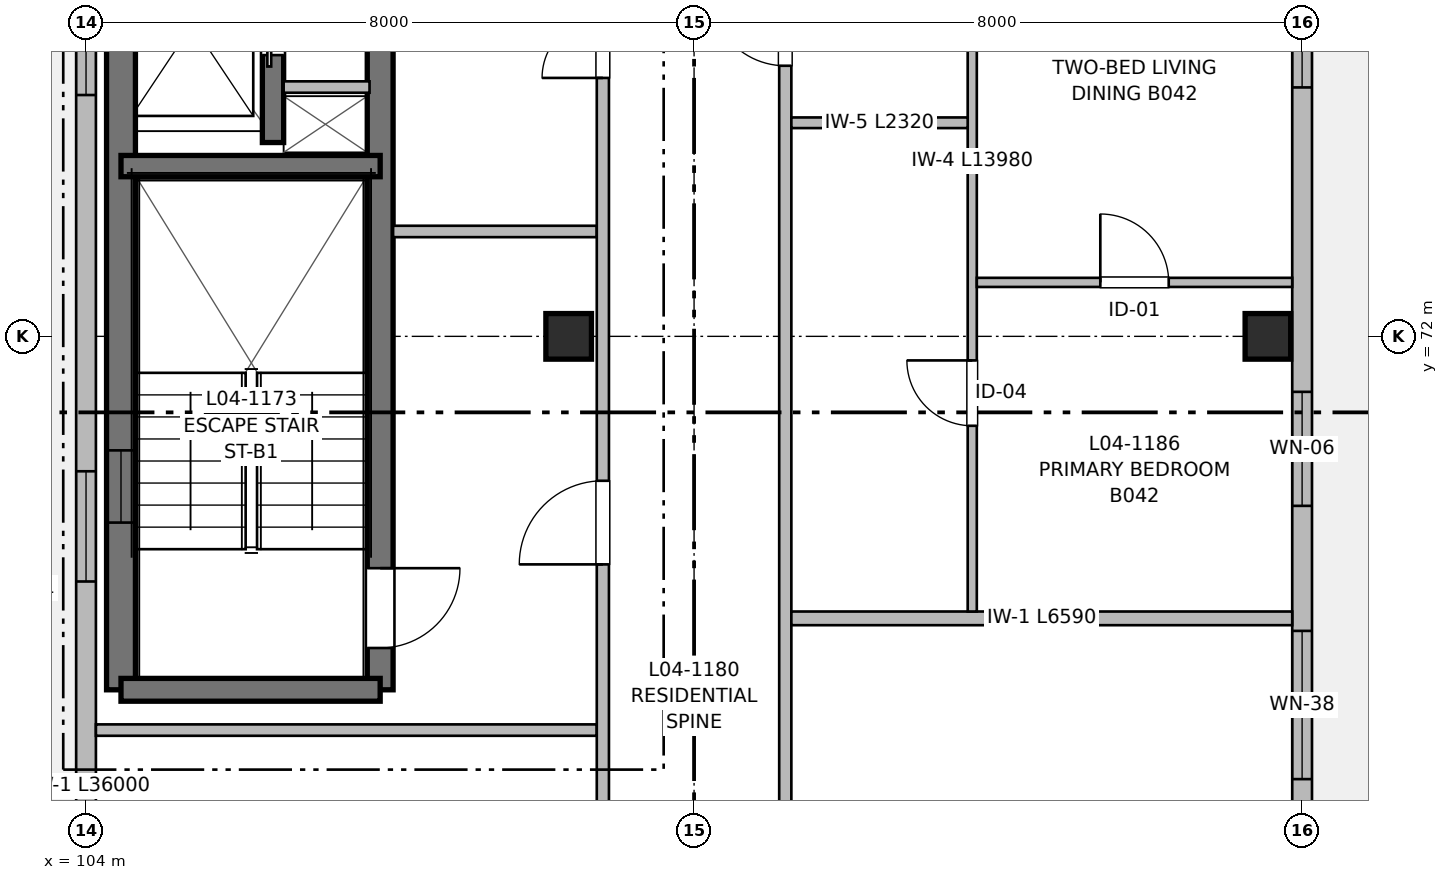
"""IFC4 building model, lengths in metres.
Left out: names, types, materials, properties, quantities, classifications, styles, units other than length and angle.
Written with IfcOpenShell. Run it as: python <this file> out.ifc"""

import sys

from ifc_helpers import new_model, si_unit, direction, frame, frame_2d, origin, origin_2d, place, context, subcontext, project, spatial, rectangle, extrude, element, fill, save


model = new_model("IFC4")
c1 = context("Model", 3, precision=1e-05, world=origin(), true_north=direction((0.0, 1.0)))
c2 = subcontext(c1, "Body", "Model", "MODEL_VIEW")
j1 = project(units=[si_unit("LENGTHUNIT", "METRE"), si_unit("PLANEANGLEUNIT", "RADIAN")], contexts=[c1])
p1 = place(None, origin())
s1 = spatial("IfcSite", under=j1, at=p1, CompositionType="ELEMENT")
p2 = place(p1, origin())
s2 = spatial("IfcBuilding", under=s1, at=p2, CompositionType="ELEMENT")
p3 = place(p2, frame((0.0, 0.0, 13.76)))
s3 = spatial("IfcBuildingStorey", under=s2, at=p3, CompositionType="ELEMENT", Elevation=13.76)
for number, where, z_axis, x_axis in (
    (1, (110.35, 72.0, 0.0), (0.0, 0.0, 1.0), (1.0, 0.0, 0.0)),
    (2, (119.55, 72.0, 0.0), (0.0, 0.0, 1.0), (1.0, 0.0, 0.0)),
):
    element("IfcColumn", number, at=place(p3, frame(where, z_axis=z_axis, x_axis=x_axis)), inside=s3, PredefinedType="COLUMN", context=c2, shape_type="SweptSolid", body=[
        extrude(rectangle(XDim=0.6, YDim=0.6, at=origin_2d()), origin(), (0.0, 0.0, 1.0), 3.2),
    ])
p4 = place(p3, frame((104.46, 67.35, 0.0), z_axis=(0.0, 0.0, 1.0), x_axis=(0.0, 1.0, 0.0)))
e3 = element("IfcWall", 3, at=p4, inside=s3, PredefinedType="SHEAR", context=c2, shape_type="SweptSolid", body=[
    extrude(rectangle(XDim=12.45, YDim=0.38, at=frame_2d((6.225, 0.0))), origin(), (0.0, 0.0, 1.0), 3.2),
])
p5 = place(p4, frame((2.2, 0.0, 0.97)))
e4 = element("IfcOpeningElement", 4, at=p5, cuts=e3, PredefinedType="OPENING", context=c2, shape_type="SweptSolid", body=[
    extrude(rectangle(XDim=0.95, YDim=1.25, at=frame_2d((0.475, 0.625))), frame((0.0, 0.2, 0.0), z_axis=(0.0, -1.0, 0.0), x_axis=(1.0, 0.0, 0.0)), (0.0, 0.0, 1.0), 0.4),
])
p6 = place(p3, frame((107.87, 79.8, 0.0), z_axis=(0.0, 0.0, 1.0), x_axis=(0.0, -1.0, 0.0)))
e5 = element("IfcWall", 5, at=p6, inside=s3, PredefinedType="SHEAR", context=c2, shape_type="SweptSolid", body=[
    extrude(rectangle(XDim=12.45, YDim=0.34, at=frame_2d((6.225, 0.0))), origin(), (0.0, 0.0, 1.0), 3.2),
])
p7 = place(p6, frame((10.85, 0.0, 0.0)))
e6 = element("IfcOpeningElement", 6, at=p7, cuts=e5, PredefinedType="OPENING", context=c2, shape_type="SweptSolid", body=[
    extrude(rectangle(XDim=1.05, YDim=2.15, at=frame_2d((0.525, 1.075))), frame((0.0, 0.18, 0.0), z_axis=(0.0, -1.0, 0.0), x_axis=(1.0, 0.0, 0.0)), (0.0, 0.0, 1.0), 0.36),
])
p8 = place(p3, frame((107.87, 67.35, 0.0), z_axis=(0.0, 0.0, 1.0), x_axis=(-1.0, 0.0, 0.0)))
e7 = element("IfcWall", 7, at=p8, inside=s3, PredefinedType="SHEAR", context=c2, shape_type="SweptSolid", body=[
    extrude(rectangle(XDim=3.41, YDim=0.3, at=frame_2d((1.705, 0.0))), origin(), (0.0, 0.0, 1.0), 3.2),
])
p9 = place(p3, frame((104.46, 74.24, 0.0), z_axis=(0.0, 0.0, 1.0), x_axis=(1.0, 0.0, 0.0)))
e8 = element("IfcWall", 8, at=p9, inside=s3, PredefinedType="SHEAR", context=c2, shape_type="SweptSolid", body=[
    extrude(rectangle(XDim=3.41, YDim=0.28, at=frame_2d((1.705, 0.0))), origin(), (0.0, 0.0, 1.0), 3.2),
])
p10 = place(p3, frame((106.46, 74.55, 0.0), z_axis=(0.0, 0.0, 1.0), x_axis=(0.0, 1.0, 0.0)))
e9 = element("IfcWall", 9, at=p10, inside=s3, PredefinedType="SHEAR", context=c2, shape_type="SweptSolid", body=[
    extrude(rectangle(XDim=5.25, YDim=0.28, at=frame_2d((2.625, 0.0))), origin(), (0.0, 0.0, 1.0), 3.2),
])
p11 = place(p10, frame((1.15, 0.0, 0.0)))
e10 = element("IfcOpeningElement", 10, at=p11, cuts=e9, PredefinedType="OPENING", context=c2, shape_type="SweptSolid", body=[
    extrude(rectangle(XDim=1.0, YDim=2.15, at=frame_2d((0.5, 1.075))), frame((0.0, 0.15, 0.0), z_axis=(0.0, -1.0, 0.0), x_axis=(1.0, 0.0, 0.0)), (0.0, 0.0, 1.0), 0.3),
])
p12 = place(p10, frame((3.85, 0.0, 0.0)))
e11 = element("IfcOpeningElement", 11, at=p12, cuts=e9, PredefinedType="OPENING", context=c2, shape_type="SweptSolid", body=[
    extrude(rectangle(XDim=0.9, YDim=2.15, at=frame_2d((0.45, 1.075))), frame((0.0, 0.15, 0.0), z_axis=(0.0, -1.0, 0.0), x_axis=(1.0, 0.0, 0.0)), (0.0, 0.0, 1.0), 0.3),
])
p13 = place(p3, frame((106.6, 75.28, 0.0), z_axis=(0.0, 0.0, 1.0), x_axis=(1.0, 0.0, 0.0)))
e12 = element("IfcWall", 12, at=p13, inside=s3, PredefinedType="PARTITIONING", context=c2, shape_type="SweptSolid", body=[
    extrude(rectangle(XDim=1.13, YDim=0.15, at=frame_2d((0.565, 0.0))), origin(), (0.0, 0.0, 1.0), 2.95),
])
p14 = place(p3, frame((120.0, 88.0, 0.0), z_axis=(0.0, 0.0, 1.0), x_axis=(0.0, -1.0, 0.0)))
e13 = element("IfcWall", 13, at=p14, inside=s3, PredefinedType="SOLIDWALL", context=c2, shape_type="SweptSolid", body=[
    extrude(rectangle(XDim=32.0, YDim=0.26, at=frame_2d((16.0, 0.0))), origin(), (0.0, 0.0, 1.0), 2.98),
])
p15 = place(p14, frame((3.4, 0.0, 0.0)))
e14 = element("IfcOpeningElement", 14, at=p15, cuts=e13, PredefinedType="OPENING", context=c2, shape_type="SweptSolid", body=[
    extrude(rectangle(XDim=1.2, YDim=2.2, at=frame_2d((0.6, 1.1))), frame((0.0, 0.14, 0.0), z_axis=(0.0, -1.0, 0.0), x_axis=(1.0, 0.0, 0.0)), (0.0, 0.0, 1.0), 0.28),
])
p16 = place(p14, frame((5.75, 0.0, 0.77)))
e15 = element("IfcOpeningElement", 15, at=p16, cuts=e13, PredefinedType="OPENING", context=c2, shape_type="SweptSolid", body=[
    extrude(rectangle(XDim=1.6, YDim=1.45, at=frame_2d((0.8, 0.725))), frame((0.0, 0.14, 0.0), z_axis=(0.0, -1.0, 0.0), x_axis=(1.0, 0.0, 0.0)), (0.0, 0.0, 1.0), 0.28),
])
p17 = place(p14, frame((11.275, 0.0, 0.77)))
e16 = element("IfcOpeningElement", 16, at=p17, cuts=e13, PredefinedType="OPENING", context=c2, shape_type="SweptSolid", body=[
    extrude(rectangle(XDim=1.45, YDim=1.45, at=frame_2d((0.725, 0.725))), frame((0.0, 0.14, 0.0), z_axis=(0.0, -1.0, 0.0), x_axis=(1.0, 0.0, 0.0)), (0.0, 0.0, 1.0), 0.28),
])
p18 = place(p14, frame((19.875, 0.0, 0.72)))
e17 = element("IfcOpeningElement", 17, at=p18, cuts=e13, PredefinedType="OPENING", context=c2, shape_type="SweptSolid", body=[
    extrude(rectangle(XDim=1.95, YDim=1.5, at=frame_2d((0.975, 0.75))), frame((0.0, 0.14, 0.0), z_axis=(0.0, -1.0, 0.0), x_axis=(1.0, 0.0, 0.0)), (0.0, 0.0, 1.0), 0.28),
])
p19 = place(p14, frame((26.7, 0.0, 0.67)))
e18 = element("IfcOpeningElement", 18, at=p19, cuts=e13, PredefinedType="OPENING", context=c2, shape_type="SweptSolid", body=[
    extrude(rectangle(XDim=2.6, YDim=1.55, at=frame_2d((1.3, 0.775))), frame((0.0, 0.14, 0.0), z_axis=(0.0, -1.0, 0.0), x_axis=(1.0, 0.0, 0.0)), (0.0, 0.0, 1.0), 0.28),
])
p20 = place(p14, frame((16.73, 0.0, 0.82)))
e19 = element("IfcOpeningElement", 19, at=p20, cuts=e13, PredefinedType="OPENING", context=c2, shape_type="SweptSolid", body=[
    extrude(rectangle(XDim=1.5, YDim=1.4, at=frame_2d((0.75, 0.7))), frame((0.0, 0.14, 0.0), z_axis=(0.0, -1.0, 0.0), x_axis=(1.0, 0.0, 0.0)), (0.0, 0.0, 1.0), 0.28),
])
p21 = place(p14, frame((0.46, 0.0, 0.9)))
e20 = element("IfcOpeningElement", 20, at=p21, cuts=e13, PredefinedType="OPENING", context=c2, shape_type="SweptSolid", body=[
    extrude(rectangle(XDim=0.65, YDim=0.95, at=frame_2d((0.325, 0.475))), frame((0.0, 0.14, 0.0), z_axis=(0.0, -1.0, 0.0), x_axis=(1.0, 0.0, 0.0)), (0.0, 0.0, 1.0), 0.28),
])
p22 = place(p3, frame((104.0, 56.0, 0.0), z_axis=(0.0, 0.0, 1.0), x_axis=(0.0, 1.0, 0.0)))
e21 = element("IfcWall", 21, at=p22, inside=s3, PredefinedType="SOLIDWALL", context=c2, shape_type="SweptSolid", body=[
    extrude(rectangle(XDim=36.0, YDim=0.26, at=frame_2d((18.0, 0.0))), origin(), (0.0, 0.0, 1.0), 2.98),
])
p23 = place(p22, frame((3.9, 0.0, 0.0)))
e22 = element("IfcOpeningElement", 22, at=p23, cuts=e21, PredefinedType="OPENING", context=c2, shape_type="SweptSolid", body=[
    extrude(rectangle(XDim=1.2, YDim=2.2, at=frame_2d((0.6, 1.1))), frame((0.0, 0.14, 0.0), z_axis=(0.0, -1.0, 0.0), x_axis=(1.0, 0.0, 0.0)), (0.0, 0.0, 1.0), 0.28),
])
p24 = place(p22, frame((5.8, 0.0, 0.77)))
e23 = element("IfcOpeningElement", 23, at=p24, cuts=e21, PredefinedType="OPENING", context=c2, shape_type="SweptSolid", body=[
    extrude(rectangle(XDim=1.6, YDim=1.45, at=frame_2d((0.8, 0.725))), frame((0.0, 0.14, 0.0), z_axis=(0.0, -1.0, 0.0), x_axis=(1.0, 0.0, 0.0)), (0.0, 0.0, 1.0), 0.28),
])
p25 = place(p22, frame((12.775, 0.0, 0.77)))
e24 = element("IfcOpeningElement", 24, at=p25, cuts=e21, PredefinedType="OPENING", context=c2, shape_type="SweptSolid", body=[
    extrude(rectangle(XDim=1.45, YDim=1.45, at=frame_2d((0.725, 0.725))), frame((0.0, 0.14, 0.0), z_axis=(0.0, -1.0, 0.0), x_axis=(1.0, 0.0, 0.0)), (0.0, 0.0, 1.0), 0.28),
])
p26 = place(p22, frame((19.175, 0.0, 0.72)))
e25 = element("IfcOpeningElement", 25, at=p26, cuts=e21, PredefinedType="OPENING", context=c2, shape_type="SweptSolid", body=[
    extrude(rectangle(XDim=1.95, YDim=1.5, at=frame_2d((0.975, 0.75))), frame((0.0, 0.14, 0.0), z_axis=(0.0, -1.0, 0.0), x_axis=(1.0, 0.0, 0.0)), (0.0, 0.0, 1.0), 0.28),
])
p27 = place(p22, frame((30.2, 0.0, 0.67)))
e26 = element("IfcOpeningElement", 26, at=p27, cuts=e21, PredefinedType="OPENING", context=c2, shape_type="SweptSolid", body=[
    extrude(rectangle(XDim=2.6, YDim=1.55, at=frame_2d((1.3, 0.775))), frame((0.0, 0.14, 0.0), z_axis=(0.0, -1.0, 0.0), x_axis=(1.0, 0.0, 0.0)), (0.0, 0.0, 1.0), 0.28),
])
p28 = place(p3, frame((104.13, 66.82, 0.0), z_axis=(0.0, 0.0, 1.0), x_axis=(1.0, 0.0, 0.0)))
e27 = element("IfcWall", 27, at=p28, inside=s3, PredefinedType="PARTITIONING", context=c2, shape_type="SweptSolid", body=[
    extrude(rectangle(XDim=6.59, YDim=0.15, at=frame_2d((3.295, 0.0))), origin(), (0.0, 0.0, 1.0), 2.935),
])
p29 = place(p3, frame((108.04, 73.38, 0.0), z_axis=(0.0, 0.0, 1.0), x_axis=(1.0, 0.0, 0.0)))
e28 = element("IfcWall", 28, at=p29, inside=s3, PredefinedType="PARTITIONING", context=c2, shape_type="SweptSolid", body=[
    extrude(rectangle(XDim=2.68, YDim=0.15, at=frame_2d((1.34, 0.0))), origin(), (0.0, 0.0, 1.0), 2.935),
])
p30 = place(p3, frame((110.8, 56.16, 0.0), z_axis=(0.0, 0.0, 1.0), x_axis=(0.0, 1.0, 0.0)))
e29 = element("IfcWall", 29, at=p30, inside=s3, PredefinedType="PARTITIONING", context=c2, shape_type="SweptSolid", body=[
    extrude(rectangle(XDim=50.64, YDim=0.16, at=frame_2d((25.32, 0.0))), origin(), (0.0, 0.0, 1.0), 2.935),
])
p31 = place(p30, frame((12.84, 0.0, 0.0)))
e30 = element("IfcOpeningElement", 30, at=p31, cuts=e29, PredefinedType="OPENING", context=c2, shape_type="SweptSolid", body=[
    extrude(rectangle(XDim=1.1, YDim=2.15, at=frame_2d((0.55, 1.075))), frame((0.0, 0.09, 0.0), z_axis=(0.0, -1.0, 0.0), x_axis=(1.0, 0.0, 0.0)), (0.0, 0.0, 1.0), 0.18),
])
p32 = place(p30, frame((19.24, 0.0, 0.0)))
e31 = element("IfcOpeningElement", 31, at=p32, cuts=e29, PredefinedType="OPENING", context=c2, shape_type="SweptSolid", body=[
    extrude(rectangle(XDim=1.6, YDim=2.15, at=frame_2d((0.8, 1.075))), frame((0.0, 0.09, 0.0), z_axis=(0.0, -1.0, 0.0), x_axis=(1.0, 0.0, 0.0)), (0.0, 0.0, 1.0), 0.18),
])
p33 = place(p30, frame((1.8, 0.0, 0.0)))
e32 = element("IfcOpeningElement", 32, at=p33, cuts=e29, PredefinedType="OPENING", context=c2, shape_type="SweptSolid", body=[
    extrude(rectangle(XDim=0.96, YDim=2.15, at=frame_2d((0.48, 1.075))), frame((0.0, 0.09, 0.0), z_axis=(0.0, -1.0, 0.0), x_axis=(1.0, 0.0, 0.0)), (0.0, 0.0, 1.0), 0.18),
])
p34 = place(p30, frame((32.745, 0.0, 0.0)))
e33 = element("IfcOpeningElement", 33, at=p34, cuts=e29, PredefinedType="OPENING", context=c2, shape_type="SweptSolid", body=[
    extrude(rectangle(XDim=0.98, YDim=2.15, at=frame_2d((0.49, 1.075))), frame((0.0, 0.09, 0.0), z_axis=(0.0, -1.0, 0.0), x_axis=(1.0, 0.0, 0.0)), (0.0, 0.0, 1.0), 0.18),
])
p35 = place(p30, frame((40.955, 0.0, 0.0)))
e34 = element("IfcOpeningElement", 34, at=p35, cuts=e29, PredefinedType="OPENING", context=c2, shape_type="SweptSolid", body=[
    extrude(rectangle(XDim=0.98, YDim=2.15, at=frame_2d((0.49, 1.075))), frame((0.0, 0.09, 0.0), z_axis=(0.0, -1.0, 0.0), x_axis=(1.0, 0.0, 0.0)), (0.0, 0.0, 1.0), 0.18),
])
p36 = place(p3, frame((113.2, 56.16, 0.0), z_axis=(0.0, 0.0, 1.0), x_axis=(0.0, 1.0, 0.0)))
e35 = element("IfcWall", 35, at=p36, inside=s3, PredefinedType="PARTITIONING", context=c2, shape_type="SweptSolid", body=[
    extrude(rectangle(XDim=50.64, YDim=0.16, at=frame_2d((25.32, 0.0))), origin(), (0.0, 0.0, 1.0), 2.935),
])
p37 = place(p36, frame((5.27, 0.0, 0.0)))
e36 = element("IfcOpeningElement", 36, at=p37, cuts=e35, PredefinedType="OPENING", context=c2, shape_type="SweptSolid", body=[
    extrude(rectangle(XDim=1.5, YDim=2.2, at=frame_2d((0.75, 1.1))), frame((0.0, 0.09, 0.0), z_axis=(0.0, -1.0, 0.0), x_axis=(1.0, 0.0, 0.0)), (0.0, 0.0, 1.0), 0.18),
])
p38 = place(p36, frame((19.4, 0.0, 0.0)))
e37 = element("IfcOpeningElement", 37, at=p38, cuts=e35, PredefinedType="OPENING", context=c2, shape_type="SweptSolid", body=[
    extrude(rectangle(XDim=0.98, YDim=2.15, at=frame_2d((0.49, 1.075))), frame((0.0, 0.09, 0.0), z_axis=(0.0, -1.0, 0.0), x_axis=(1.0, 0.0, 0.0)), (0.0, 0.0, 1.0), 0.18),
])
p39 = place(p36, frame((33.1, 0.0, 0.0)))
e38 = element("IfcOpeningElement", 38, at=p39, cuts=e35, PredefinedType="OPENING", context=c2, shape_type="SweptSolid", body=[
    extrude(rectangle(XDim=0.98, YDim=2.15, at=frame_2d((0.49, 1.075))), frame((0.0, 0.09, 0.0), z_axis=(0.0, -1.0, 0.0), x_axis=(1.0, 0.0, 0.0)), (0.0, 0.0, 1.0), 0.18),
])
p40 = place(p36, frame((45.35, 0.0, 0.0)))
e39 = element("IfcOpeningElement", 39, at=p40, cuts=e35, PredefinedType="OPENING", context=c2, shape_type="SweptSolid", body=[
    extrude(rectangle(XDim=0.98, YDim=2.15, at=frame_2d((0.49, 1.075))), frame((0.0, 0.09, 0.0), z_axis=(0.0, -1.0, 0.0), x_axis=(1.0, 0.0, 0.0)), (0.0, 0.0, 1.0), 0.18),
])
p41 = place(p3, frame((113.28, 68.29, 0.0), z_axis=(0.0, 0.0, 1.0), x_axis=(1.0, 0.0, 0.0)))
e40 = element("IfcWall", 40, at=p41, inside=s3, PredefinedType="PARTITIONING", context=c2, shape_type="SweptSolid", body=[
    extrude(rectangle(XDim=6.59, YDim=0.18, at=frame_2d((3.295, 0.0))), origin(), (0.0, 0.0, 1.0), 2.935),
])
p42 = place(p3, frame((115.66, 68.38, 0.0), z_axis=(0.0, 0.0, 1.0), x_axis=(0.0, 1.0, 0.0)))
e41 = element("IfcWall", 41, at=p42, inside=s3, PredefinedType="PARTITIONING", context=c2, shape_type="SweptSolid", body=[
    extrude(rectangle(XDim=13.98, YDim=0.12, at=frame_2d((6.99, 0.0))), origin(), (0.0, 0.0, 1.0), 2.935),
])
p43 = place(p42, frame((2.443, 0.0, 0.0)))
e42 = element("IfcOpeningElement", 42, at=p43, cuts=e41, PredefinedType="OPENING", context=c2, shape_type="SweptSolid", body=[
    extrude(rectangle(XDim=0.86, YDim=2.1, at=frame_2d((0.43, 1.05))), frame((0.0, 0.07, 0.0), z_axis=(0.0, -1.0, 0.0), x_axis=(1.0, 0.0, 0.0)), (0.0, 0.0, 1.0), 0.14),
])
p44 = place(p42, frame((8.544, 0.0, 0.0)))
e43 = element("IfcOpeningElement", 43, at=p44, cuts=e41, PredefinedType="OPENING", context=c2, shape_type="SweptSolid", body=[
    extrude(rectangle(XDim=0.92, YDim=2.1, at=frame_2d((0.46, 1.05))), frame((0.0, 0.07, 0.0), z_axis=(0.0, -1.0, 0.0), x_axis=(1.0, 0.0, 0.0)), (0.0, 0.0, 1.0), 0.14),
])
p45 = place(p3, frame((113.28, 74.81, 0.0), z_axis=(0.0, 0.0, 1.0), x_axis=(1.0, 0.0, 0.0)))
e44 = element("IfcWall", 44, at=p45, inside=s3, PredefinedType="PARTITIONING", context=c2, shape_type="SweptSolid", body=[
    extrude(rectangle(XDim=2.32, YDim=0.14, at=frame_2d((1.16, 0.0))), origin(), (0.0, 0.0, 1.0), 2.935),
])
p46 = place(p3, frame((115.72, 72.71, 0.0), z_axis=(0.0, 0.0, 1.0), x_axis=(1.0, 0.0, 0.0)))
e45 = element("IfcWall", 45, at=p46, inside=s3, PredefinedType="PARTITIONING", context=c2, shape_type="SweptSolid", body=[
    extrude(rectangle(XDim=4.15, YDim=0.12, at=frame_2d((2.075, 0.0))), origin(), (0.0, 0.0, 1.0), 2.935),
])
p47 = place(p46, frame((1.625, 0.0, 0.0)))
e46 = element("IfcOpeningElement", 46, at=p47, cuts=e45, PredefinedType="OPENING", context=c2, shape_type="SweptSolid", body=[
    extrude(rectangle(XDim=0.9, YDim=2.1, at=frame_2d((0.45, 1.05))), frame((0.0, 0.07, 0.0), z_axis=(0.0, -1.0, 0.0), x_axis=(1.0, 0.0, 0.0)), (0.0, 0.0, 1.0), 0.14),
])
p48 = place(p11, origin())
e47 = element("IfcDoor", 47, at=p48, inside=s3, OperationType="SLIDING_TO_LEFT", PredefinedType="DOOR", context=c2, shape_type="SweptSolid", body=[
    extrude(rectangle(XDim=1.0, YDim=2.15, at=frame_2d((0.5, 1.075))), frame((0.0, 0.025, 0.0), z_axis=(0.0, -1.0, 0.0), x_axis=(1.0, 0.0, 0.0)), (0.0, 0.0, 1.0), 0.05),
])
fill(e10, e47)
p49 = place(p7, origin())
e48 = element("IfcDoor", 48, at=p49, inside=s3, OperationType="SINGLE_SWING_LEFT", PredefinedType="DOOR", context=c2, shape_type="SweptSolid", body=[
    extrude(rectangle(XDim=1.05, YDim=2.15, at=frame_2d((0.525, 1.075))), frame((0.0, 0.025, 0.0), z_axis=(0.0, -1.0, 0.0), x_axis=(1.0, 0.0, 0.0)), (0.0, 0.0, 1.0), 0.05),
])
fill(e6, e48)
p50 = place(p5, origin())
e49 = element("IfcWindow", 49, at=p50, inside=s3, PartitioningType="SINGLE_PANEL", PredefinedType="WINDOW", context=c2, shape_type="SweptSolid", body=[
    extrude(rectangle(XDim=0.95, YDim=1.25, at=frame_2d((0.475, 0.625))), frame((0.0, 0.03, 0.0), z_axis=(0.0, -1.0, 0.0), x_axis=(1.0, 0.0, 0.0)), (0.0, 0.0, 1.0), 0.06),
])
fill(e4, e49)
p51 = place(p17, origin())
e50 = element("IfcWindow", 50, at=p51, inside=s3, PartitioningType="SINGLE_PANEL", PredefinedType="WINDOW", context=c2, shape_type="SweptSolid", body=[
    extrude(rectangle(XDim=1.45, YDim=1.45, at=frame_2d((0.725, 0.725))), frame((0.0, 0.03, 0.0), z_axis=(0.0, -1.0, 0.0), x_axis=(1.0, 0.0, 0.0)), (0.0, 0.0, 1.0), 0.06),
])
fill(e16, e50)
p52 = place(p18, origin())
e51 = element("IfcWindow", 51, at=p52, inside=s3, PartitioningType="SINGLE_PANEL", PredefinedType="WINDOW", context=c2, shape_type="SweptSolid", body=[
    extrude(rectangle(XDim=1.95, YDim=1.5, at=frame_2d((0.975, 0.75))), frame((0.0, 0.03, 0.0), z_axis=(0.0, -1.0, 0.0), x_axis=(1.0, 0.0, 0.0)), (0.0, 0.0, 1.0), 0.06),
])
fill(e17, e51)
p53 = place(p25, origin())
e52 = element("IfcWindow", 52, at=p53, inside=s3, PartitioningType="SINGLE_PANEL", PredefinedType="WINDOW", context=c2, shape_type="SweptSolid", body=[
    extrude(rectangle(XDim=1.45, YDim=1.45, at=frame_2d((0.725, 0.725))), frame((0.0, 0.03, 0.0), z_axis=(0.0, -1.0, 0.0), x_axis=(1.0, 0.0, 0.0)), (0.0, 0.0, 1.0), 0.06),
])
fill(e24, e52)
p54 = place(p26, origin())
e53 = element("IfcWindow", 53, at=p54, inside=s3, PartitioningType="SINGLE_PANEL", PredefinedType="WINDOW", context=c2, shape_type="SweptSolid", body=[
    extrude(rectangle(XDim=1.95, YDim=1.5, at=frame_2d((0.975, 0.75))), frame((0.0, 0.03, 0.0), z_axis=(0.0, -1.0, 0.0), x_axis=(1.0, 0.0, 0.0)), (0.0, 0.0, 1.0), 0.06),
])
fill(e25, e53)
p55 = place(p31, origin())
e54 = element("IfcDoor", 54, at=p55, inside=s3, OperationType="SINGLE_SWING_LEFT", PredefinedType="DOOR", context=c2, shape_type="SweptSolid", body=[
    extrude(rectangle(XDim=1.1, YDim=2.15, at=frame_2d((0.55, 1.075))), frame((0.0, 0.025, 0.0), z_axis=(0.0, -1.0, 0.0), x_axis=(1.0, 0.0, 0.0)), (0.0, 0.0, 1.0), 0.05),
])
fill(e30, e54)
p56 = place(p32, origin())
e55 = element("IfcDoor", 55, at=p56, inside=s3, OperationType="DOUBLE_DOOR_SINGLE_SWING", PredefinedType="DOOR", context=c2, shape_type="SweptSolid", body=[
    extrude(rectangle(XDim=1.6, YDim=2.15, at=frame_2d((0.8, 1.075))), frame((0.0, 0.025, 0.0), z_axis=(0.0, -1.0, 0.0), x_axis=(1.0, 0.0, 0.0)), (0.0, 0.0, 1.0), 0.05),
])
fill(e31, e55)
p57 = place(p43, origin())
e56 = element("IfcDoor", 56, at=p57, inside=s3, OperationType="SINGLE_SWING_RIGHT", PredefinedType="DOOR", context=c2, shape_type="SweptSolid", body=[
    extrude(rectangle(XDim=0.86, YDim=2.1, at=frame_2d((0.43, 1.05))), frame((0.0, 0.025, 0.0), z_axis=(0.0, -1.0, 0.0), x_axis=(1.0, 0.0, 0.0)), (0.0, 0.0, 1.0), 0.05),
])
fill(e42, e56)
p58 = place(p38, origin())
e57 = element("IfcDoor", 57, at=p58, inside=s3, OperationType="SINGLE_SWING_RIGHT", PredefinedType="DOOR", context=c2, shape_type="SweptSolid", body=[
    extrude(rectangle(XDim=0.98, YDim=2.15, at=frame_2d((0.49, 1.075))), frame((0.0, 0.025, 0.0), z_axis=(0.0, -1.0, 0.0), x_axis=(1.0, 0.0, 0.0)), (0.0, 0.0, 1.0), 0.05),
])
fill(e37, e57)
p59 = place(p47, origin())
e58 = element("IfcDoor", 58, at=p59, inside=s3, OperationType="SINGLE_SWING_LEFT", PredefinedType="DOOR", context=c2, shape_type="SweptSolid", body=[
    extrude(rectangle(XDim=0.9, YDim=2.1, at=frame_2d((0.45, 1.05))), frame((0.0, 0.025, 0.0), z_axis=(0.0, -1.0, 0.0), x_axis=(1.0, 0.0, 0.0)), (0.0, 0.0, 1.0), 0.05),
])
fill(e46, e58)
p60 = place(p20, origin())
e59 = element("IfcWindow", 59, at=p60, inside=s3, PartitioningType="SINGLE_PANEL", PredefinedType="WINDOW", context=c2, shape_type="SweptSolid", body=[
    extrude(rectangle(XDim=1.5, YDim=1.4, at=frame_2d((0.75, 0.7))), frame((0.0, 0.03, 0.0), z_axis=(0.0, -1.0, 0.0), x_axis=(1.0, 0.0, 0.0)), (0.0, 0.0, 1.0), 0.06),
])
fill(e19, e59)
save(model, sys.argv[1])
